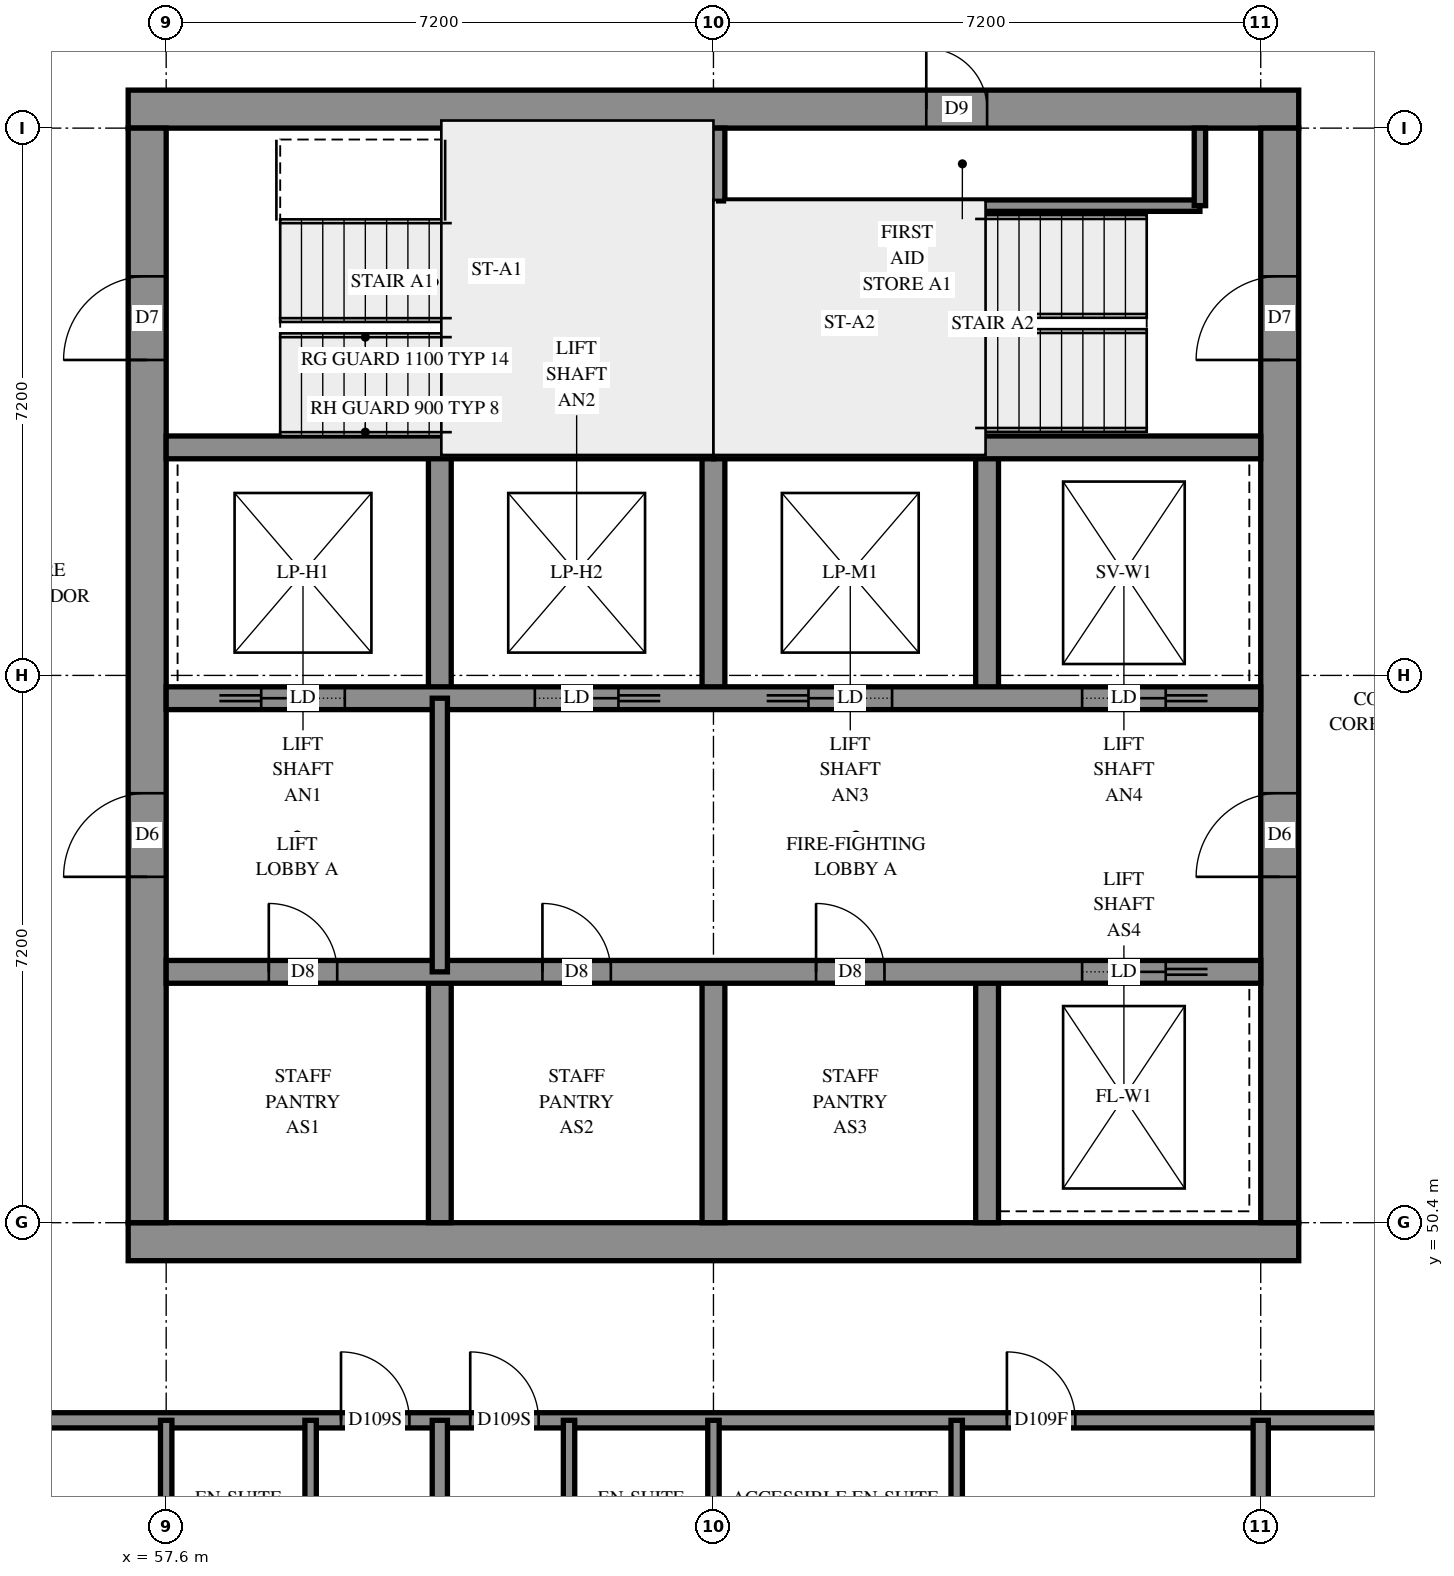
"""IFC4 building model, lengths in metres.
Left out: names, types, materials, properties, quantities, classifications, styles, units other than length and angle.
Written with IfcOpenShell. Run it as: python <this file> out.ifc"""

import sys

from ifc_helpers import new_model, si_unit, direction, frame, frame_2d, origin, place, context, subcontext, project, spatial, rectangle, extrude, element, fill, save


model = new_model("IFC4")
c1 = context("Model", 3, precision=1e-05, world=origin(), true_north=direction((0.0, 1.0)))
c2 = subcontext(c1, "Body", "Model", "MODEL_VIEW")
j1 = project(units=[si_unit("LENGTHUNIT", "METRE"), si_unit("PLANEANGLEUNIT", "RADIAN")], contexts=[c1])
p1 = place(None, origin())
s1 = spatial("IfcSite", under=j1, at=p1, CompositionType="ELEMENT")
p2 = place(p1, origin())
s2 = spatial("IfcBuilding", under=s1, at=p2, CompositionType="ELEMENT")
p3 = place(p2, frame((0.0, 0.0, 223.6)))
s3 = spatial("IfcBuildingStorey", under=s2, at=p3, CompositionType="ELEMENT", Elevation=223.6)
p4 = place(p3, frame((57.1, 50.15, -0.3), z_axis=(0.0, 0.0, 1.0), x_axis=(1.0, 0.0, 0.0)))
e1 = element("IfcWall", 1, at=p4, inside=s3, PredefinedType="SHEAR", context=c2, shape_type="SweptSolid", body=[
    extrude(rectangle(XDim=15.4, YDim=0.5, at=frame_2d((7.7, 0.0))), origin(), (0.0, 0.0, 1.0), 2.7),
])
p5 = place(p3, frame((57.1, 65.05, -0.3), z_axis=(0.0, 0.0, 1.0), x_axis=(1.0, 0.0, 0.0)))
e2 = element("IfcWall", 2, at=p5, inside=s3, PredefinedType="SHEAR", context=c2, shape_type="SweptSolid", body=[
    extrude(rectangle(XDim=15.4, YDim=0.5, at=frame_2d((7.7, 0.0))), origin(), (0.0, 0.0, 1.0), 2.7),
])
p6 = place(p5, frame((10.5, 0.0, 0.3)))
e3 = element("IfcOpeningElement", 3, at=p6, cuts=e2, PredefinedType="OPENING", context=c2, shape_type="SweptSolid", body=[
    extrude(rectangle(XDim=0.8, YDim=2.1, at=frame_2d((0.4, 1.05))), frame((0.0, 0.26, 0.0), z_axis=(0.0, -1.0, 0.0), x_axis=(1.0, 0.0, 0.0)), (0.0, 0.0, 1.0), 0.52),
])
p7 = place(p3, frame((57.35, 50.4, -0.3), z_axis=(0.0, 0.0, 1.0), x_axis=(0.0, 1.0, 0.0)))
e4 = element("IfcWall", 4, at=p7, inside=s3, PredefinedType="SHEAR", context=c2, shape_type="SweptSolid", body=[
    extrude(rectangle(XDim=14.4, YDim=0.5, at=frame_2d((7.2, 0.0))), origin(), (0.0, 0.0, 1.0), 2.7),
])
p8 = place(p7, frame((4.55, 0.0, 0.3)))
e5 = element("IfcOpeningElement", 5, at=p8, cuts=e4, PredefinedType="OPENING", context=c2, shape_type="SweptSolid", body=[
    extrude(rectangle(XDim=1.1, YDim=2.1, at=frame_2d((0.55, 1.05))), frame((0.0, 0.26, 0.0), z_axis=(0.0, -1.0, 0.0), x_axis=(1.0, 0.0, 0.0)), (0.0, 0.0, 1.0), 0.52),
])
p9 = place(p7, frame((11.35, 0.0, 0.3)))
e6 = element("IfcOpeningElement", 6, at=p9, cuts=e4, PredefinedType="OPENING", context=c2, shape_type="SweptSolid", body=[
    extrude(rectangle(XDim=1.1, YDim=2.1, at=frame_2d((0.55, 1.05))), frame((0.0, 0.26, 0.0), z_axis=(0.0, -1.0, 0.0), x_axis=(1.0, 0.0, 0.0)), (0.0, 0.0, 1.0), 0.52),
])
p10 = place(p3, frame((72.25, 50.4, -0.3), z_axis=(0.0, 0.0, 1.0), x_axis=(0.0, 1.0, 0.0)))
e7 = element("IfcWall", 7, at=p10, inside=s3, PredefinedType="SHEAR", context=c2, shape_type="SweptSolid", body=[
    extrude(rectangle(XDim=14.4, YDim=0.5, at=frame_2d((7.2, 0.0))), origin(), (0.0, 0.0, 1.0), 2.7),
])
p11 = place(p10, frame((4.55, 0.0, 0.3)))
e8 = element("IfcOpeningElement", 8, at=p11, cuts=e7, PredefinedType="OPENING", context=c2, shape_type="SweptSolid", body=[
    extrude(rectangle(XDim=1.1, YDim=2.1, at=frame_2d((0.55, 1.05))), frame((0.0, 0.26, 0.0), z_axis=(0.0, -1.0, 0.0), x_axis=(1.0, 0.0, 0.0)), (0.0, 0.0, 1.0), 0.52),
])
p12 = place(p10, frame((11.35, 0.0, 0.3)))
e9 = element("IfcOpeningElement", 9, at=p12, cuts=e7, PredefinedType="OPENING", context=c2, shape_type="SweptSolid", body=[
    extrude(rectangle(XDim=1.1, YDim=2.1, at=frame_2d((0.55, 1.05))), frame((0.0, 0.26, 0.0), z_axis=(0.0, -1.0, 0.0), x_axis=(1.0, 0.0, 0.0)), (0.0, 0.0, 1.0), 0.52),
])
for number, where, z_axis, x_axis in (
    (10, (61.2, 50.4, 0.0), (0.0, 0.0, 1.0), (0.0, 1.0, 0.0)),
    (11, (61.2, 57.3, 0.0), (0.0, 0.0, 1.0), (0.0, 1.0, 0.0)),
    (12, (64.8, 50.4, 0.0), (0.0, 0.0, 1.0), (0.0, 1.0, 0.0)),
    (13, (64.8, 57.3, 0.0), (0.0, 0.0, 1.0), (0.0, 1.0, 0.0)),
    (14, (68.4, 50.4, 0.0), (0.0, 0.0, 1.0), (0.0, 1.0, 0.0)),
    (15, (68.4, 57.3, 0.0), (0.0, 0.0, 1.0), (0.0, 1.0, 0.0)),
):
    element("IfcWall", number, at=place(p3, frame(where, z_axis=z_axis, x_axis=x_axis)), inside=s3, PredefinedType="SOLIDWALL", context=c2, shape_type="SweptSolid", body=[
        extrude(rectangle(XDim=3.3, YDim=0.3, at=frame_2d((1.65, 0.0))), origin(), (0.0, 0.0, 1.0), 3.1),
    ])
p13 = place(p3, frame((57.6, 53.7, 0.0), z_axis=(0.0, 0.0, 1.0), x_axis=(1.0, 0.0, 0.0)))
e16 = element("IfcWall", 16, at=p13, inside=s3, PredefinedType="SOLIDWALL", context=c2, shape_type="SweptSolid", body=[
    extrude(rectangle(XDim=14.4, YDim=0.3, at=frame_2d((7.2, 0.0))), origin(), (0.0, 0.0, 1.0), 3.1),
])
p14 = place(p13, frame((1.35, 0.0, 0.0)))
e17 = element("IfcOpeningElement", 17, at=p14, cuts=e16, PredefinedType="OPENING", context=c2, shape_type="SweptSolid", body=[
    extrude(rectangle(XDim=0.9, YDim=2.1, at=frame_2d((0.45, 1.05))), frame((0.0, 0.16, 0.0), z_axis=(0.0, -1.0, 0.0), x_axis=(1.0, 0.0, 0.0)), (0.0, 0.0, 1.0), 0.32),
])
p15 = place(p13, frame((4.95, 0.0, 0.0)))
e18 = element("IfcOpeningElement", 18, at=p15, cuts=e16, PredefinedType="OPENING", context=c2, shape_type="SweptSolid", body=[
    extrude(rectangle(XDim=0.9, YDim=2.1, at=frame_2d((0.45, 1.05))), frame((0.0, 0.16, 0.0), z_axis=(0.0, -1.0, 0.0), x_axis=(1.0, 0.0, 0.0)), (0.0, 0.0, 1.0), 0.32),
])
p16 = place(p13, frame((8.55, 0.0, 0.0)))
e19 = element("IfcOpeningElement", 19, at=p16, cuts=e16, PredefinedType="OPENING", context=c2, shape_type="SweptSolid", body=[
    extrude(rectangle(XDim=0.9, YDim=2.1, at=frame_2d((0.45, 1.05))), frame((0.0, 0.16, 0.0), z_axis=(0.0, -1.0, 0.0), x_axis=(1.0, 0.0, 0.0)), (0.0, 0.0, 1.0), 0.32),
])
p17 = place(p13, frame((12.05, 0.0, 0.0)))
e20 = element("IfcOpeningElement", 20, at=p17, cuts=e16, PredefinedType="OPENING", context=c2, shape_type="SweptSolid", body=[
    extrude(rectangle(XDim=1.1, YDim=2.1, at=frame_2d((0.55, 1.05))), frame((0.0, 0.16, 0.0), z_axis=(0.0, -1.0, 0.0), x_axis=(1.0, 0.0, 0.0)), (0.0, 0.0, 1.0), 0.32),
])
p18 = place(p3, frame((57.6, 57.3, 0.0), z_axis=(0.0, 0.0, 1.0), x_axis=(1.0, 0.0, 0.0)))
e21 = element("IfcWall", 21, at=p18, inside=s3, PredefinedType="SOLIDWALL", context=c2, shape_type="SweptSolid", body=[
    extrude(rectangle(XDim=14.4, YDim=0.3, at=frame_2d((7.2, 0.0))), origin(), (0.0, 0.0, 1.0), 3.1),
])
p19 = place(p18, frame((1.25, 0.0, 0.0)))
e22 = element("IfcOpeningElement", 22, at=p19, cuts=e21, PredefinedType="OPENING", context=c2, shape_type="SweptSolid", body=[
    extrude(rectangle(XDim=1.1, YDim=2.1, at=frame_2d((0.55, 1.05))), frame((0.0, 0.16, 0.0), z_axis=(0.0, -1.0, 0.0), x_axis=(1.0, 0.0, 0.0)), (0.0, 0.0, 1.0), 0.32),
])
p20 = place(p18, frame((4.85, 0.0, 0.0)))
e23 = element("IfcOpeningElement", 23, at=p20, cuts=e21, PredefinedType="OPENING", context=c2, shape_type="SweptSolid", body=[
    extrude(rectangle(XDim=1.1, YDim=2.1, at=frame_2d((0.55, 1.05))), frame((0.0, 0.16, 0.0), z_axis=(0.0, -1.0, 0.0), x_axis=(1.0, 0.0, 0.0)), (0.0, 0.0, 1.0), 0.32),
])
p21 = place(p18, frame((8.45, 0.0, 0.0)))
e24 = element("IfcOpeningElement", 24, at=p21, cuts=e21, PredefinedType="OPENING", context=c2, shape_type="SweptSolid", body=[
    extrude(rectangle(XDim=1.1, YDim=2.1, at=frame_2d((0.55, 1.05))), frame((0.0, 0.16, 0.0), z_axis=(0.0, -1.0, 0.0), x_axis=(1.0, 0.0, 0.0)), (0.0, 0.0, 1.0), 0.32),
])
p22 = place(p18, frame((12.05, 0.0, 0.0)))
e25 = element("IfcOpeningElement", 25, at=p22, cuts=e21, PredefinedType="OPENING", context=c2, shape_type="SweptSolid", body=[
    extrude(rectangle(XDim=1.1, YDim=2.1, at=frame_2d((0.55, 1.05))), frame((0.0, 0.16, 0.0), z_axis=(0.0, -1.0, 0.0), x_axis=(1.0, 0.0, 0.0)), (0.0, 0.0, 1.0), 0.32),
])
for number, where, z_axis, x_axis in (
    (26, (57.6, 60.6, 0.0), (0.0, 0.0, 1.0), (1.0, 0.0, 0.0)),
    (27, (64.8, 60.6, 0.0), (0.0, 0.0, 1.0), (1.0, 0.0, 0.0)),
):
    element("IfcWall", number, at=place(p3, frame(where, z_axis=z_axis, x_axis=x_axis)), inside=s3, PredefinedType="SOLIDWALL", context=c2, shape_type="SweptSolid", body=[
        extrude(rectangle(XDim=7.2, YDim=0.3, at=frame_2d((3.6, 0.0))), origin(), (0.0, 0.0, 1.0), 3.1),
    ])
p23 = place(p3, frame((64.8, 60.6, 0.0), z_axis=(0.0, 0.0, 1.0), x_axis=(0.0, 1.0, 0.0)))
e28 = element("IfcWall", 28, at=p23, inside=s3, PredefinedType="SOLIDWALL", context=c2, shape_type="SweptSolid", body=[
    extrude(rectangle(XDim=4.2, YDim=0.3, at=frame_2d((2.1, 0.0))), origin(), (0.0, 0.0, 1.0), 3.1),
])
p24 = place(p3, frame((64.95, 63.78, 0.0), z_axis=(0.0, 0.0, 1.0), x_axis=(1.0, 0.0, 0.0)))
e29 = element("IfcWall", 29, at=p24, inside=s3, PredefinedType="PARTITIONING", context=c2, shape_type="SweptSolid", body=[
    extrude(rectangle(XDim=6.25, YDim=0.15, at=frame_2d((3.125, 0.0))), origin(), (0.0, 0.0, 1.0), 3.1),
])
p25 = place(p3, frame((71.2, 63.78, 0.0), z_axis=(0.0, 0.0, 1.0), x_axis=(0.0, 1.0, 0.0)))
e30 = element("IfcWall", 30, at=p25, inside=s3, PredefinedType="PARTITIONING", context=c2, shape_type="SweptSolid", body=[
    extrude(rectangle(XDim=1.02, YDim=0.15, at=frame_2d((0.51, 0.0))), origin(), (0.0, 0.0, 1.0), 3.1),
])
p26 = place(p3, frame((61.2, 53.7, 0.0), z_axis=(0.0, 0.0, 1.0), x_axis=(0.0, 1.0, 0.0)))
e31 = element("IfcWall", 31, at=p26, inside=s3, PredefinedType="PARTITIONING", context=c2, shape_type="SweptSolid", body=[
    extrude(rectangle(XDim=3.6, YDim=0.2, at=frame_2d((1.8, 0.0))), origin(), (0.0, 0.0, 1.0), 3.1),
])
p27 = place(p3, frame((55.0, 47.8, 0.0), z_axis=(0.0, 0.0, 1.0), x_axis=(1.0, 0.0, 0.0)))
e32 = element("IfcWall", 32, at=p27, inside=s3, PredefinedType="PARTITIONING", context=c2, shape_type="SweptSolid", body=[
    extrude(rectangle(XDim=19.266, YDim=0.2, at=frame_2d((9.633, 0.0))), origin(), (0.0, 0.0, 1.0), 3.1),
])
p28 = place(p27, frame((4.9, 0.0, 0.0)))
e33 = element("IfcOpeningElement", 33, at=p28, cuts=e32, PredefinedType="OPENING", context=c2, shape_type="SweptSolid", body=[
    extrude(rectangle(XDim=0.9, YDim=2.1, at=frame_2d((0.45, 1.05))), frame((0.0, 0.11, 0.0), z_axis=(0.0, -1.0, 0.0), x_axis=(1.0, 0.0, 0.0)), (0.0, 0.0, 1.0), 0.22),
])
p29 = place(p27, frame((6.6, 0.0, 0.0)))
e34 = element("IfcOpeningElement", 34, at=p29, cuts=e32, PredefinedType="OPENING", context=c2, shape_type="SweptSolid", body=[
    extrude(rectangle(XDim=0.9, YDim=2.1, at=frame_2d((0.45, 1.05))), frame((0.0, 0.11, 0.0), z_axis=(0.0, -1.0, 0.0), x_axis=(1.0, 0.0, 0.0)), (0.0, 0.0, 1.0), 0.22),
])
p30 = place(p27, frame((13.661, 0.0, 0.0)))
e35 = element("IfcOpeningElement", 35, at=p30, cuts=e32, PredefinedType="OPENING", context=c2, shape_type="SweptSolid", body=[
    extrude(rectangle(XDim=0.9, YDim=2.1, at=frame_2d((0.45, 1.05))), frame((0.0, 0.11, 0.0), z_axis=(0.0, -1.0, 0.0), x_axis=(1.0, 0.0, 0.0)), (0.0, 0.0, 1.0), 0.22),
])
p31 = place(p3, frame((61.2, 42.317, 0.0), z_axis=(0.0, 0.0, 1.0), x_axis=(0.0, 1.0, 0.0)))
e36 = element("IfcWall", 36, at=p31, inside=s3, PredefinedType="PARTITIONING", context=c2, shape_type="SweptSolid", body=[
    extrude(rectangle(XDim=5.483, YDim=0.2, at=frame_2d((2.742, 0.0))), origin(), (0.0, 0.0, 1.0), 3.1),
])
p32 = place(p3, frame((72.0, 43.6, 0.0), z_axis=(0.0, 0.0, 1.0), x_axis=(0.0, 1.0, 0.0)))
e37 = element("IfcWall", 37, at=p32, inside=s3, PredefinedType="PARTITIONING", context=c2, shape_type="SweptSolid", body=[
    extrude(rectangle(XDim=4.2, YDim=0.2, at=frame_2d((2.1, 0.0))), origin(), (0.0, 0.0, 1.0), 3.1),
])
for number, where, z_axis, x_axis in (
    (38, (59.5, 45.4, 0.0), (0.0, 0.0, 1.0), (0.0, 1.0, 0.0)),
    (39, (57.6, 45.4, 0.0), (0.0, 0.0, 1.0), (0.0, 1.0, 0.0)),
    (40, (62.9, 45.4, 0.0), (0.0, 0.0, 1.0), (0.0, 1.0, 0.0)),
    (41, (68.0, 45.4, 0.0), (0.0, 0.0, 1.0), (0.0, 1.0, 0.0)),
    (42, (64.8, 45.4, 0.0), (0.0, 0.0, 1.0), (0.0, 1.0, 0.0)),
):
    element("IfcWall", number, at=place(p3, frame(where, z_axis=z_axis, x_axis=x_axis)), inside=s3, PredefinedType="PARTITIONING", context=c2, shape_type="SweptSolid", body=[
        extrude(rectangle(XDim=2.4, YDim=0.15, at=frame_2d((1.2, 0.0))), origin(), (0.0, 0.0, 1.0), 3.1),
    ])
p33 = place(p6, origin())
e43 = element("IfcDoor", 43, at=p33, inside=s3, OperationType="SINGLE_SWING_RIGHT", PredefinedType="DOOR", context=c2, shape_type="SweptSolid", body=[
    extrude(rectangle(XDim=0.8, YDim=2.1, at=frame_2d((0.4, 1.05))), frame((0.0, 0.025, 0.0), z_axis=(0.0, -1.0, 0.0), x_axis=(1.0, 0.0, 0.0)), (0.0, 0.0, 1.0), 0.05),
])
fill(e3, e43)
p34 = place(p8, origin())
e44 = element("IfcDoor", 44, at=p34, inside=s3, OperationType="DOUBLE_DOOR_SINGLE_SWING", PredefinedType="DOOR", context=c2, shape_type="SweptSolid", body=[
    extrude(rectangle(XDim=1.1, YDim=2.1, at=frame_2d((0.55, 1.05))), frame((0.0, 0.025, 0.0), z_axis=(0.0, -1.0, 0.0), x_axis=(1.0, 0.0, 0.0)), (0.0, 0.0, 1.0), 0.05),
])
fill(e5, e44)
p35 = place(p11, origin())
e45 = element("IfcDoor", 45, at=p35, inside=s3, OperationType="DOUBLE_DOOR_SINGLE_SWING", PredefinedType="DOOR", context=c2, shape_type="SweptSolid", body=[
    extrude(rectangle(XDim=1.1, YDim=2.1, at=frame_2d((0.55, 1.05))), frame((0.0, 0.025, 0.0), z_axis=(0.0, -1.0, 0.0), x_axis=(1.0, 0.0, 0.0)), (0.0, 0.0, 1.0), 0.05),
])
fill(e8, e45)
p36 = place(p9, origin())
e46 = element("IfcDoor", 46, at=p36, inside=s3, OperationType="SINGLE_SWING_LEFT", PredefinedType="DOOR", context=c2, shape_type="SweptSolid", body=[
    extrude(rectangle(XDim=1.1, YDim=2.1, at=frame_2d((0.55, 1.05))), frame((0.0, 0.025, 0.0), z_axis=(0.0, -1.0, 0.0), x_axis=(1.0, 0.0, 0.0)), (0.0, 0.0, 1.0), 0.05),
])
fill(e6, e46)
p37 = place(p12, origin())
e47 = element("IfcDoor", 47, at=p37, inside=s3, OperationType="SINGLE_SWING_RIGHT", PredefinedType="DOOR", context=c2, shape_type="SweptSolid", body=[
    extrude(rectangle(XDim=1.1, YDim=2.1, at=frame_2d((0.55, 1.05))), frame((0.0, 0.025, 0.0), z_axis=(0.0, -1.0, 0.0), x_axis=(1.0, 0.0, 0.0)), (0.0, 0.0, 1.0), 0.05),
])
fill(e9, e47)
p38 = place(p14, origin())
e48 = element("IfcDoor", 48, at=p38, inside=s3, OperationType="SINGLE_SWING_LEFT", PredefinedType="DOOR", context=c2, shape_type="SweptSolid", body=[
    extrude(rectangle(XDim=0.9, YDim=2.1, at=frame_2d((0.45, 1.05))), frame((0.0, 0.025, 0.0), z_axis=(0.0, -1.0, 0.0), x_axis=(1.0, 0.0, 0.0)), (0.0, 0.0, 1.0), 0.05),
])
fill(e17, e48)
p39 = place(p15, origin())
e49 = element("IfcDoor", 49, at=p39, inside=s3, OperationType="SINGLE_SWING_LEFT", PredefinedType="DOOR", context=c2, shape_type="SweptSolid", body=[
    extrude(rectangle(XDim=0.9, YDim=2.1, at=frame_2d((0.45, 1.05))), frame((0.0, 0.025, 0.0), z_axis=(0.0, -1.0, 0.0), x_axis=(1.0, 0.0, 0.0)), (0.0, 0.0, 1.0), 0.05),
])
fill(e18, e49)
p40 = place(p16, origin())
e50 = element("IfcDoor", 50, at=p40, inside=s3, OperationType="SINGLE_SWING_LEFT", PredefinedType="DOOR", context=c2, shape_type="SweptSolid", body=[
    extrude(rectangle(XDim=0.9, YDim=2.1, at=frame_2d((0.45, 1.05))), frame((0.0, 0.025, 0.0), z_axis=(0.0, -1.0, 0.0), x_axis=(1.0, 0.0, 0.0)), (0.0, 0.0, 1.0), 0.05),
])
fill(e19, e50)
p41 = place(p17, origin())
e51 = element("IfcDoor", 51, at=p41, inside=s3, OperationType="SLIDING_TO_RIGHT", PredefinedType="DOOR", context=c2, shape_type="SweptSolid", body=[
    extrude(rectangle(XDim=1.1, YDim=2.1, at=frame_2d((0.55, 1.05))), frame((0.0, 0.025, 0.0), z_axis=(0.0, -1.0, 0.0), x_axis=(1.0, 0.0, 0.0)), (0.0, 0.0, 1.0), 0.05),
])
fill(e20, e51)
p42 = place(p19, origin())
e52 = element("IfcDoor", 52, at=p42, inside=s3, OperationType="SLIDING_TO_LEFT", PredefinedType="DOOR", context=c2, shape_type="SweptSolid", body=[
    extrude(rectangle(XDim=1.1, YDim=2.1, at=frame_2d((0.55, 1.05))), frame((0.0, 0.025, 0.0), z_axis=(0.0, -1.0, 0.0), x_axis=(1.0, 0.0, 0.0)), (0.0, 0.0, 1.0), 0.05),
])
fill(e22, e52)
p43 = place(p20, origin())
e53 = element("IfcDoor", 53, at=p43, inside=s3, OperationType="SLIDING_TO_RIGHT", PredefinedType="DOOR", context=c2, shape_type="SweptSolid", body=[
    extrude(rectangle(XDim=1.1, YDim=2.1, at=frame_2d((0.55, 1.05))), frame((0.0, 0.025, 0.0), z_axis=(0.0, -1.0, 0.0), x_axis=(1.0, 0.0, 0.0)), (0.0, 0.0, 1.0), 0.05),
])
fill(e23, e53)
p44 = place(p21, origin())
e54 = element("IfcDoor", 54, at=p44, inside=s3, OperationType="SLIDING_TO_LEFT", PredefinedType="DOOR", context=c2, shape_type="SweptSolid", body=[
    extrude(rectangle(XDim=1.1, YDim=2.1, at=frame_2d((0.55, 1.05))), frame((0.0, 0.025, 0.0), z_axis=(0.0, -1.0, 0.0), x_axis=(1.0, 0.0, 0.0)), (0.0, 0.0, 1.0), 0.05),
])
fill(e24, e54)
p45 = place(p22, origin())
e55 = element("IfcDoor", 55, at=p45, inside=s3, OperationType="SLIDING_TO_RIGHT", PredefinedType="DOOR", context=c2, shape_type="SweptSolid", body=[
    extrude(rectangle(XDim=1.1, YDim=2.1, at=frame_2d((0.55, 1.05))), frame((0.0, 0.025, 0.0), z_axis=(0.0, -1.0, 0.0), x_axis=(1.0, 0.0, 0.0)), (0.0, 0.0, 1.0), 0.05),
])
fill(e25, e55)
p46 = place(p28, origin())
e56 = element("IfcDoor", 56, at=p46, inside=s3, OperationType="SINGLE_SWING_LEFT", PredefinedType="DOOR", context=c2, shape_type="SweptSolid", body=[
    extrude(rectangle(XDim=0.9, YDim=2.1, at=frame_2d((0.45, 1.05))), frame((0.0, 0.025, 0.0), z_axis=(0.0, -1.0, 0.0), x_axis=(1.0, 0.0, 0.0)), (0.0, 0.0, 1.0), 0.05),
])
fill(e33, e56)
p47 = place(p29, origin())
e57 = element("IfcDoor", 57, at=p47, inside=s3, OperationType="SINGLE_SWING_RIGHT", PredefinedType="DOOR", context=c2, shape_type="SweptSolid", body=[
    extrude(rectangle(XDim=0.9, YDim=2.1, at=frame_2d((0.45, 1.05))), frame((0.0, 0.025, 0.0), z_axis=(0.0, -1.0, 0.0), x_axis=(1.0, 0.0, 0.0)), (0.0, 0.0, 1.0), 0.05),
])
fill(e34, e57)
p48 = place(p30, origin())
e58 = element("IfcDoor", 58, at=p48, inside=s3, OperationType="SINGLE_SWING_LEFT", PredefinedType="DOOR", context=c2, shape_type="SweptSolid", body=[
    extrude(rectangle(XDim=0.9, YDim=2.1, at=frame_2d((0.45, 1.05))), frame((0.0, 0.025, 0.0), z_axis=(0.0, -1.0, 0.0), x_axis=(1.0, 0.0, 0.0)), (0.0, 0.0, 1.0), 0.05),
])
fill(e35, e58)
save(model, sys.argv[1])
